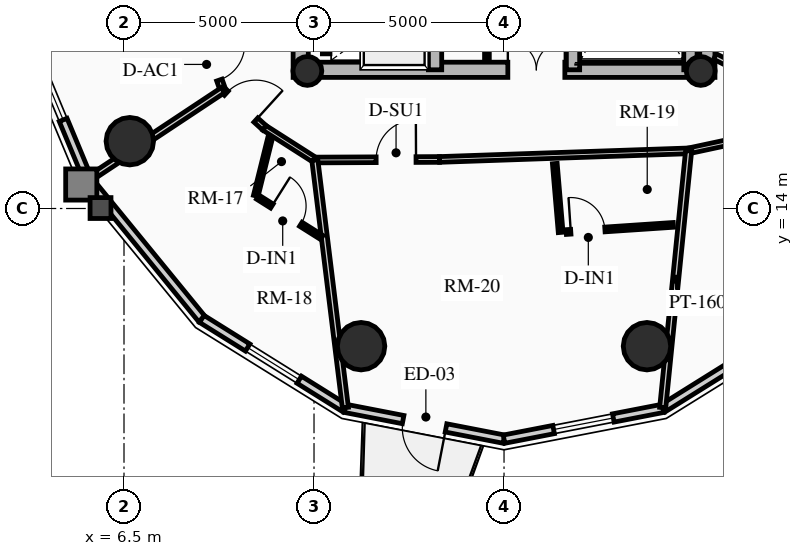
"""IFC4 building model, lengths in metres.
Left out: names, types, materials, properties, quantities, classifications, styles, units other than length and angle.
Written with IfcOpenShell. Run it as: python <this file> out.ifc"""

import sys

from ifc_helpers import new_model, si_unit, direction, frame, frame_2d, origin, origin_2d, place, context, subcontext, project, spatial, rectangle, circle, hollow_circle, extrude, source, transform, mapped, element, fill, save


model = new_model("IFC4")
c1 = context("Model", 3, precision=1e-05, world=origin(), true_north=direction((0.0, 1.0)))
c2 = subcontext(c1, "Body", "Model", "MODEL_VIEW")
j1 = project(units=[si_unit("LENGTHUNIT", "METRE"), si_unit("PLANEANGLEUNIT", "RADIAN")], contexts=[c1])
p1 = place(None, origin())
s1 = spatial("IfcSite", under=j1, at=p1, CompositionType="ELEMENT")
p2 = place(p1, origin())
s2 = spatial("IfcBuilding", under=s1, at=p2, CompositionType="ELEMENT")
p3 = place(p2, frame((0.0, 0.0, 177.79)))
s3 = spatial("IfcBuildingStorey", under=s2, at=p3, CompositionType="ELEMENT", Elevation=177.79)
for number, where, z_axis, x_axis in (
    (1, (11.15, 17.45, 0.0), (0.0, 0.0, 1.0), (0.0, 1.0, 0.0)),
    (2, (21.85, 17.45, 0.0), (0.0, 0.0, 1.0), (0.0, 1.0, 0.0)),
):
    element("IfcWall", number, at=place(p3, frame(where, z_axis=z_axis, x_axis=x_axis)), inside=s3, PredefinedType="SHEAR", context=c2, shape_type="SweptSolid", body=[
        extrude(rectangle(XDim=14.1, YDim=0.4, at=frame_2d((7.05, 0.0))), origin(), (0.0, 0.0, 1.0), 2.91),
    ])
p4 = place(p3, frame((11.15, 17.65, 0.0), z_axis=(0.0, 0.0, 1.0), x_axis=(1.0, 0.0, 0.0)))
e3 = element("IfcWall", 3, at=p4, inside=s3, PredefinedType="SHEAR", context=c2, shape_type="SweptSolid", body=[
    extrude(rectangle(XDim=10.7, YDim=0.4, at=frame_2d((5.35, 0.0))), origin(), (0.0, 0.0, 1.0), 2.91),
])
m1 = source(origin(), c2, "Body", "SweptSolid", [
    extrude(rectangle(XDim=1.5, YDim=2.02, at=frame_2d((0.75, 1.01))), frame((0.0, 0.21, 0.0), z_axis=(0.0, -1.0, 0.0), x_axis=(1.0, 0.0, 0.0)), (0.0, 0.0, 1.0), 0.42),
])
p5 = place(p4, frame((5.45, 0.0, 0.0)))
e4 = element("IfcOpeningElement", 4, at=p5, cuts=e3, PredefinedType="OPENING", context=c2, shape_type="MappedRepresentation", body=[
    mapped(m1, transform((0.0, 0.0, 0.0), x_axis=(1.0, 0.0, 0.0), y_axis=(0.0, 1.0, 0.0), z_axis=(0.0, 0.0, 1.0), scale=1.0)),
])
p6 = place(p3, frame((14.685, 17.65, 0.0), z_axis=(0.0, 0.0, 1.0), x_axis=(0.0, 1.0, 0.0)))
e5 = element("IfcWall", 5, at=p6, inside=s3, PredefinedType="SHEAR", context=c2, shape_type="SweptSolid", body=[
    extrude(rectangle(XDim=13.7, YDim=0.35, at=frame_2d((6.85, 0.0))), origin(), (0.0, 0.0, 1.0), 2.91),
])
m2 = source(origin(), c2, "Body", "SweptSolid", [
    extrude(rectangle(XDim=1.1, YDim=2.015, at=frame_2d((0.55, 1.007))), frame((0.0, 0.185, 0.0), z_axis=(0.0, -1.0, 0.0), x_axis=(1.0, 0.0, 0.0)), (0.0, 0.0, 1.0), 0.37),
])
p7 = place(p6, frame((4.85, 0.0, 0.0)))
e6 = element("IfcOpeningElement", 6, at=p7, cuts=e5, PredefinedType="OPENING", context=c2, shape_type="MappedRepresentation", body=[
    mapped(m2, transform((0.0, 0.0, 0.0), x_axis=(1.0, 0.0, 0.0), y_axis=(0.0, 1.0, 0.0), z_axis=(0.0, 0.0, 1.0), scale=1.0)),
])
p8 = place(p6, frame((0.625, 0.0, 0.0)))
e7 = element("IfcOpeningElement", 7, at=p8, cuts=e5, PredefinedType="OPENING", context=c2, shape_type="MappedRepresentation", body=[
    mapped(m2, transform((0.0, 0.0, 0.0), x_axis=(1.0, 0.0, 0.0), y_axis=(0.0, 1.0, 0.0), z_axis=(0.0, 0.0, 1.0), scale=1.0)),
])
p9 = place(p6, frame((2.625, 0.0, 0.0)))
e8 = element("IfcOpeningElement", 8, at=p9, cuts=e5, PredefinedType="OPENING", context=c2, shape_type="MappedRepresentation", body=[
    mapped(m2, transform((0.0, 0.0, 0.0), x_axis=(1.0, 0.0, 0.0), y_axis=(0.0, 1.0, 0.0), z_axis=(0.0, 0.0, 1.0), scale=1.0)),
])
m3 = source(origin(), c2, "Body", "SweptSolid", [
    extrude(rectangle(XDim=1.15, YDim=2.02, at=frame_2d((0.575, 1.01))), frame((0.0, 0.185, 0.0), z_axis=(0.0, -1.0, 0.0), x_axis=(1.0, 0.0, 0.0)), (0.0, 0.0, 1.0), 0.37),
])
p10 = place(p6, frame((7.27, 0.0, 0.0)))
e9 = element("IfcOpeningElement", 9, at=p10, cuts=e5, PredefinedType="OPENING", context=c2, shape_type="MappedRepresentation", body=[
    mapped(m3, transform((0.0, 0.0, 0.0), x_axis=(1.0, 0.0, 0.0), y_axis=(0.0, 1.0, 0.0), z_axis=(0.0, 0.0, 1.0), scale=1.0)),
])
p11 = place(p3, frame((18.315, 17.65, 0.0), z_axis=(0.0, 0.0, 1.0), x_axis=(0.0, 1.0, 0.0)))
e10 = element("IfcWall", 10, at=p11, inside=s3, PredefinedType="SHEAR", context=c2, shape_type="SweptSolid", body=[
    extrude(rectangle(XDim=9.6, YDim=0.35, at=frame_2d((4.8, 0.0))), origin(), (0.0, 0.0, 1.0), 2.91),
])
p12 = place(p11, frame((5.28, 0.0, 0.0)))
e11 = element("IfcOpeningElement", 11, at=p12, cuts=e10, PredefinedType="OPENING", context=c2, shape_type="MappedRepresentation", body=[
    mapped(m3, transform((0.0, 0.0, 0.0), x_axis=(1.0, 0.0, 0.0), y_axis=(0.0, 1.0, 0.0), z_axis=(0.0, 0.0, 1.0), scale=1.0)),
])
p13 = place(p3, frame((21.405, 17.65, 0.0), z_axis=(0.0, 0.0, 1.0), x_axis=(0.0, 1.0, 0.0)))
e12 = element("IfcWall", 12, at=p13, inside=s3, PredefinedType="SHEAR", context=c2, shape_type="SweptSolid", body=[
    extrude(rectangle(XDim=6.695, YDim=0.35, at=frame_2d((3.348, 0.0))), origin(), (0.0, 0.0, 1.0), 2.91),
])
for number, where, z_axis, x_axis in (
    (13, (11.325, 17.62, 0.0), (0.0, 0.0, 1.0), (1.0, 0.0, 0.0)),
    (14, (21.675, 17.62, 0.0), (0.0, 0.0, 1.0), (1.0, 0.0, 0.0)),
):
    element("IfcColumn", number, at=place(p3, frame(where, z_axis=z_axis, x_axis=x_axis)), inside=s3, PredefinedType="COLUMN", context=c2, shape_type="SweptSolid", body=[
        extrude(hollow_circle(Radius=0.38, WallThickness=0.032, at=origin_2d()), origin(), (0.0, 0.0, 1.0), 2.91),
    ])
for number, where, z_axis, x_axis in (
    (15, (6.653, 15.771, 0.0), (0.0, 0.0, 1.0), (1.0, 0.0, 0.0)),
    (16, (12.739, 10.377, 0.0), (0.0, 0.0, 1.0), (1.0, 0.0, 0.0)),
    (17, (20.261, 10.377, 0.0), (0.0, 0.0, 1.0), (1.0, 0.0, 0.0)),
):
    element("IfcColumn", number, at=place(p3, frame(where, z_axis=z_axis, x_axis=x_axis)), inside=s3, PredefinedType="USERDEFINED", context=c2, shape_type="SweptSolid", body=[
        extrude(circle(Radius=0.625, at=origin_2d()), origin(), (0.0, 0.0, 1.0), 2.91),
    ])
p14 = place(p3, frame((5.553, 14.76, 0.0), z_axis=(0.0, 0.0, 1.0), x_axis=(-0.384144094086, 0.923273152961, 0.0)))
e18 = element("IfcWall", 18, at=p14, inside=s3, PredefinedType="SOLIDWALL", context=c2, shape_type="SweptSolid", body=[
    extrude(rectangle(XDim=5.003, YDim=0.22, at=frame_2d((2.501, 0.0))), origin(), (0.0, 0.0, 1.0), 2.245),
])
m4 = source(origin(), c2, "Body", "SweptSolid", [
    extrude(rectangle(XDim=1.6, YDim=1.3, at=frame_2d((0.8, 0.65))), frame((0.0, 0.12, 0.0), z_axis=(0.0, -1.0, 0.0), x_axis=(1.0, 0.0, 0.0)), (0.0, 0.0, 1.0), 0.24),
])
p15 = place(p14, frame((1.702, 0.0, 0.65)))
e19 = element("IfcOpeningElement", 19, at=p15, cuts=e18, PredefinedType="OPENING", context=c2, shape_type="MappedRepresentation", body=[
    mapped(m4, transform((0.0, 0.0, 0.0), x_axis=(1.0, 0.0, 0.0), y_axis=(0.0, 1.0, 0.0), z_axis=(0.0, 0.0, 1.0), scale=1.0)),
])
p16 = place(p3, frame((8.547, 11.094, 0.0), z_axis=(0.0, 0.0, 1.0), x_axis=(-0.632470615287, 0.774584353572, 0.0)))
e20 = element("IfcWall", 20, at=p16, inside=s3, PredefinedType="SOLIDWALL", context=c2, shape_type="SweptSolid", body=[
    extrude(rectangle(XDim=4.733, YDim=0.22, at=frame_2d((2.366, 0.0))), origin(), (0.0, 0.0, 1.0), 2.245),
])
p17 = place(p3, frame((12.319, 8.741, 0.0), z_axis=(0.0, 0.0, 1.0), x_axis=(-0.848399108042, 0.529357113368, 0.0)))
e21 = element("IfcWall", 21, at=p17, inside=s3, PredefinedType="SOLIDWALL", context=c2, shape_type="SweptSolid", body=[
    extrude(rectangle(XDim=4.446, YDim=0.22, at=frame_2d((2.223, 0.0))), origin(), (0.0, 0.0, 1.0), 2.245),
])
p18 = place(p17, frame((1.423, 0.0, 0.65)))
e22 = element("IfcOpeningElement", 22, at=p18, cuts=e21, PredefinedType="OPENING", context=c2, shape_type="MappedRepresentation", body=[
    mapped(m4, transform((0.0, 0.0, 0.0), x_axis=(1.0, 0.0, 0.0), y_axis=(0.0, 1.0, 0.0), z_axis=(0.0, 0.0, 1.0), scale=1.0)),
])
p19 = place(p3, frame((16.5, 7.93, 0.0), z_axis=(0.0, 0.0, 1.0), x_axis=(-0.981703883443, 0.190413983815, 0.0)))
e23 = element("IfcWall", 23, at=p19, inside=s3, PredefinedType="SOLIDWALL", context=c2, shape_type="SweptSolid", body=[
    extrude(rectangle(XDim=4.259, YDim=0.22, at=frame_2d((2.13, 0.0))), origin(), (0.0, 0.0, 1.0), 2.245),
])
m5 = source(origin(), c2, "Body", "SweptSolid", [
    extrude(rectangle(XDim=1.15, YDim=2.005, at=frame_2d((0.575, 1.002))), frame((0.0, 0.12, 0.0), z_axis=(0.0, -1.0, 0.0), x_axis=(1.0, 0.0, 0.0)), (0.0, 0.0, 1.0), 0.24),
])
p20 = place(p19, frame((1.555, 0.0, 0.0)))
e24 = element("IfcOpeningElement", 24, at=p20, cuts=e23, PredefinedType="OPENING", context=c2, shape_type="MappedRepresentation", body=[
    mapped(m5, transform((0.0, 0.0, 0.0), x_axis=(1.0, 0.0, 0.0), y_axis=(0.0, 1.0, 0.0), z_axis=(0.0, 0.0, 1.0), scale=1.0)),
])
p21 = place(p3, frame((20.681, 8.741, 0.0), z_axis=(0.0, 0.0, 1.0), x_axis=(-0.981703883443, -0.190413983815, 0.0)))
e25 = element("IfcWall", 25, at=p21, inside=s3, PredefinedType="SOLIDWALL", context=c2, shape_type="SweptSolid", body=[
    extrude(rectangle(XDim=4.259, YDim=0.22, at=frame_2d((2.13, 0.0))), origin(), (0.0, 0.0, 1.0), 2.245),
])
p22 = place(p21, frame((1.33, 0.0, 0.65)))
e26 = element("IfcOpeningElement", 26, at=p22, cuts=e25, PredefinedType="OPENING", context=c2, shape_type="MappedRepresentation", body=[
    mapped(m4, transform((0.0, 0.0, 0.0), x_axis=(1.0, 0.0, 0.0), y_axis=(0.0, 1.0, 0.0), z_axis=(0.0, 0.0, 1.0), scale=1.0)),
])
p23 = place(p3, frame((24.453, 11.094, 0.0), z_axis=(0.0, 0.0, 1.0), x_axis=(-0.848399108042, -0.529357113368, 0.0)))
e27 = element("IfcWall", 27, at=p23, inside=s3, PredefinedType="SOLIDWALL", context=c2, shape_type="SweptSolid", body=[
    extrude(rectangle(XDim=4.446, YDim=0.22, at=frame_2d((2.223, 0.0))), origin(), (0.0, 0.0, 1.0), 2.245),
])
p24 = place(p3, frame((11.82, 18.07, 0.0), z_axis=(0.0, 0.0, 1.0), x_axis=(0.0, 1.0, 0.0)))
e28 = element("IfcWall", 28, at=p24, inside=s3, PredefinedType="SHEAR", context=c2, shape_type="SweptSolid", body=[
    extrude(rectangle(XDim=1.635, YDim=0.2, at=frame_2d((0.817, 0.0))), origin(), (0.0, 0.0, 1.0), 2.91),
])
p25 = place(p3, frame((16.05, 17.92, 0.0), z_axis=(0.0, 0.0, 1.0), x_axis=(0.0, 1.0, 0.0)))
e29 = element("IfcWall", 29, at=p25, inside=s3, PredefinedType="PARTITIONING", context=c2, shape_type="SweptSolid", body=[
    extrude(rectangle(XDim=1.8, YDim=0.125, at=frame_2d((0.9, 0.0))), origin(), (0.0, 0.0, 1.0), 2.675),
])
m6 = source(origin(), c2, "Body", "SweptSolid", [
    extrude(rectangle(XDim=0.9, YDim=2.005, at=frame_2d((0.45, 1.002))), frame((0.0, 0.073, 0.0), z_axis=(0.0, -1.0, 0.0), x_axis=(1.0, 0.0, 0.0)), (0.0, 0.0, 1.0), 0.145),
])
p26 = place(p25, frame((0.42, 0.0, 0.0)))
e30 = element("IfcOpeningElement", 30, at=p26, cuts=e29, PredefinedType="OPENING", context=c2, shape_type="MappedRepresentation", body=[
    mapped(m6, transform((0.0, 0.0, 0.0), x_axis=(1.0, 0.0, 0.0), y_axis=(0.0, 1.0, 0.0), z_axis=(0.0, 0.0, 1.0), scale=1.0)),
])
p27 = place(p3, frame((8.636, 18.436, 0.0), z_axis=(0.0, 0.0, 1.0), x_axis=(0.333211866524, -0.942851977782, 0.0)))
e31 = element("IfcWall", 31, at=p27, inside=s3, PredefinedType="PARTITIONING", context=c2, shape_type="SweptSolid", body=[
    extrude(rectangle(XDim=1.402, YDim=0.15, at=frame_2d((0.701, 0.0))), origin(), (0.0, 0.0, 1.0), 2.245),
])
m7 = source(origin(), c2, "Body", "SweptSolid", [
    extrude(rectangle(XDim=1.0, YDim=2.015, at=frame_2d((0.5, 1.007))), frame((0.0, 0.085, 0.0), z_axis=(0.0, -1.0, 0.0), x_axis=(1.0, 0.0, 0.0)), (0.0, 0.0, 1.0), 0.17),
])
p28 = place(p27, frame((0.12, 0.0, 0.0)))
e32 = element("IfcOpeningElement", 32, at=p28, cuts=e31, PredefinedType="OPENING", context=c2, shape_type="MappedRepresentation", body=[
    mapped(m7, transform((0.0, 0.0, 0.0), x_axis=(1.0, 0.0, 0.0), y_axis=(0.0, 1.0, 0.0), z_axis=(0.0, 0.0, 1.0), scale=1.0)),
])
p29 = place(p3, frame((9.103, 17.115, 0.0), z_axis=(0.0, 0.0, 1.0), x_axis=(0.740186897911, -0.672401186912, 0.0)))
e33 = element("IfcWall", 33, at=p29, inside=s3, PredefinedType="PARTITIONING", context=c2, shape_type="SweptSolid", body=[
    extrude(rectangle(XDim=1.477, YDim=0.15, at=frame_2d((0.738, 0.0))), origin(), (0.0, 0.0, 1.0), 2.245),
])
m8 = source(origin(), c2, "Body", "SweptSolid", [
    extrude(rectangle(XDim=1.05, YDim=2.015, at=frame_2d((0.525, 1.007))), frame((0.0, 0.085, 0.0), z_axis=(0.0, -1.0, 0.0), x_axis=(1.0, 0.0, 0.0)), (0.0, 0.0, 1.0), 0.17),
])
p30 = place(p29, frame((0.12, 0.0, 0.0)))
e34 = element("IfcOpeningElement", 34, at=p30, cuts=e33, PredefinedType="OPENING", context=c2, shape_type="MappedRepresentation", body=[
    mapped(m8, transform((0.0, 0.0, 0.0), x_axis=(1.0, 0.0, 0.0), y_axis=(0.0, 1.0, 0.0), z_axis=(0.0, 0.0, 1.0), scale=1.0)),
])
p31 = place(p3, frame((10.196, 16.122, 0.0), z_axis=(0.0, 0.0, 1.0), x_axis=(0.843021142441, -0.537880426673, 0.0)))
e35 = element("IfcWall", 35, at=p31, inside=s3, PredefinedType="PARTITIONING", context=c2, shape_type="SweptSolid", body=[
    extrude(rectangle(XDim=1.571, YDim=0.15, at=frame_2d((0.786, 0.0))), origin(), (0.0, 0.0, 1.0), 2.245),
])
p32 = place(p3, frame((11.521, 15.276, 0.0), z_axis=(0.0, 0.0, 1.0), x_axis=(0.999990688463, 0.004315436007, 0.0)))
e36 = element("IfcWall", 36, at=p32, inside=s3, PredefinedType="PARTITIONING", context=c2, shape_type="SweptSolid", body=[
    extrude(rectangle(XDim=3.281, YDim=0.15, at=frame_2d((1.641, 0.0))), origin(), (0.0, 0.0, 1.0), 2.245),
])
p33 = place(p32, frame((1.613, 0.0, 0.0)))
e37 = element("IfcOpeningElement", 37, at=p33, cuts=e36, PredefinedType="OPENING", context=c2, shape_type="MappedRepresentation", body=[
    mapped(m8, transform((0.0, 0.0, 0.0), x_axis=(1.0, 0.0, 0.0), y_axis=(0.0, 1.0, 0.0), z_axis=(0.0, 0.0, 1.0), scale=1.0)),
])
p34 = place(p3, frame((14.802, 15.291, 0.0), z_axis=(0.0, 0.0, 1.0), x_axis=(0.999405778293, 0.034468686011, 0.0)))
e38 = element("IfcWall", 38, at=p34, inside=s3, PredefinedType="PARTITIONING", context=c2, shape_type="SweptSolid", body=[
    extrude(rectangle(XDim=6.559, YDim=0.15, at=frame_2d((3.279, 0.0))), origin(), (0.0, 0.0, 1.0), 2.245),
])
p35 = place(p3, frame((21.357, 15.517, 0.0), z_axis=(0.0, 0.0, 1.0), x_axis=(0.977773676035, 0.209663154733, 0.0)))
e39 = element("IfcWall", 39, at=p35, inside=s3, PredefinedType="PARTITIONING", context=c2, shape_type="SweptSolid", body=[
    extrude(rectangle(XDim=1.865, YDim=0.15, at=frame_2d((0.933, 0.0))), origin(), (0.0, 0.0, 1.0), 2.245),
])
p36 = place(p3, frame((9.103, 17.115, 0.0), z_axis=(0.0, 0.0, 1.0), x_axis=(-0.833535637115, -0.552465692745, 0.0)))
e40 = element("IfcWall", 40, at=p36, inside=s3, PredefinedType="PARTITIONING", context=c2, shape_type="SweptSolid", body=[
    extrude(rectangle(XDim=4.24, YDim=0.16, at=frame_2d((2.12, 0.0))), origin(), (0.0, 0.0, 1.0), 2.245),
])
p37 = place(p3, frame((11.521, 15.276, 0.0), z_axis=(0.0, 0.0, 1.0), x_axis=(0.122446537769, -0.992475110715, 0.0)))
e41 = element("IfcWall", 41, at=p37, inside=s3, PredefinedType="PARTITIONING", context=c2, shape_type="SweptSolid", body=[
    extrude(rectangle(XDim=6.566, YDim=0.16, at=frame_2d((3.283, 0.0))), origin(), (0.0, 0.0, 1.0), 2.245),
])
p38 = place(p3, frame((21.357, 15.517, 0.0), z_axis=(0.0, 0.0, 1.0), x_axis=(-0.100446941693, -0.994942416376, 0.0)))
e42 = element("IfcWall", 42, at=p38, inside=s3, PredefinedType="PARTITIONING", context=c2, shape_type="SweptSolid", body=[
    extrude(rectangle(XDim=6.791, YDim=0.16, at=frame_2d((3.396, 0.0))), origin(), (0.0, 0.0, 1.0), 2.245),
])
p39 = place(p3, frame((22.05, 18.0, 0.0), z_axis=(0.0, 0.0, 1.0), x_axis=(0.890660222535, -0.454669515136, 0.0)))
e43 = element("IfcWall", 43, at=p39, inside=s3, PredefinedType="PARTITIONING", context=c2, shape_type="SweptSolid", body=[
    extrude(rectangle(XDim=2.144, YDim=0.16, at=frame_2d((1.072, 0.0))), origin(), (0.0, 0.0, 1.0), 2.245),
])
m9 = source(origin(), c2, "Body", "SweptSolid", [
    extrude(rectangle(XDim=1.05, YDim=2.015, at=frame_2d((0.525, 1.007))), frame((0.0, 0.09, 0.0), z_axis=(0.0, -1.0, 0.0), x_axis=(1.0, 0.0, 0.0)), (0.0, 0.0, 1.0), 0.18),
])
p40 = place(p39, frame((0.894, 0.0, 0.0)))
e44 = element("IfcOpeningElement", 44, at=p40, cuts=e43, PredefinedType="OPENING", context=c2, shape_type="MappedRepresentation", body=[
    mapped(m9, transform((0.0, 0.0, 0.0), x_axis=(1.0, 0.0, 0.0), y_axis=(0.0, 1.0, 0.0), z_axis=(0.0, 0.0, 1.0), scale=1.0)),
])
p41 = place(p3, frame((10.343, 15.847, 0.0), z_axis=(0.0, 0.0, 1.0), x_axis=(-0.240988864291, -0.970527880737, 0.0)))
e45 = element("IfcWall", 45, at=p41, inside=s3, PredefinedType="PARTITIONING", context=c2, shape_type="SweptSolid", body=[
    extrude(rectangle(XDim=1.56, YDim=0.125, at=frame_2d((0.78, 0.0))), origin(), (0.0, 0.0, 1.0), 2.245),
])
p42 = place(p3, frame((10.02, 14.299, 0.0), z_axis=(0.0, 0.0, 1.0), x_axis=(0.846015763056, -0.533157883427, 0.0)))
e46 = element("IfcWall", 46, at=p42, inside=s3, PredefinedType="PARTITIONING", context=c2, shape_type="SweptSolid", body=[
    extrude(rectangle(XDim=1.991, YDim=0.125, at=frame_2d((0.996, 0.0))), origin(), (0.0, 0.0, 1.0), 2.675),
])
p43 = place(p42, frame((0.439, 0.0, 0.0)))
e47 = element("IfcOpeningElement", 47, at=p43, cuts=e46, PredefinedType="OPENING", context=c2, shape_type="MappedRepresentation", body=[
    mapped(m6, transform((0.0, 0.0, 0.0), x_axis=(1.0, 0.0, 0.0), y_axis=(0.0, 1.0, 0.0), z_axis=(0.0, 0.0, 1.0), scale=1.0)),
])
p44 = place(p3, frame((17.836, 15.182, 0.0), z_axis=(0.0, 0.0, 1.0), x_axis=(0.084856554172, -0.996393178025, 0.0)))
e48 = element("IfcWall", 48, at=p44, inside=s3, PredefinedType="PARTITIONING", context=c2, shape_type="SweptSolid", body=[
    extrude(rectangle(XDim=1.818, YDim=0.125, at=frame_2d((0.909, 0.0))), origin(), (0.0, 0.0, 1.0), 2.675),
])
p45 = place(p3, frame((18.137, 13.38, 0.0), z_axis=(0.0, 0.0, 1.0), x_axis=(0.997767152953, 0.066788535611, 0.0)))
e49 = element("IfcWall", 49, at=p45, inside=s3, PredefinedType="PARTITIONING", context=c2, shape_type="SweptSolid", body=[
    extrude(rectangle(XDim=2.826, YDim=0.125, at=frame_2d((1.413, 0.0))), origin(), (0.0, 0.0, 1.0), 2.245),
])
p46 = place(p45, frame((0.12, 0.0, 0.0)))
e50 = element("IfcOpeningElement", 50, at=p46, cuts=e49, PredefinedType="OPENING", context=c2, shape_type="MappedRepresentation", body=[
    mapped(m6, transform((0.0, 0.0, 0.0), x_axis=(1.0, 0.0, 0.0), y_axis=(0.0, 1.0, 0.0), z_axis=(0.0, 0.0, 1.0), scale=1.0)),
])
m10 = source(origin(), c2, "Body", "SweptSolid", [
    extrude(rectangle(XDim=1.6, YDim=1.3, at=frame_2d((0.8, 0.65))), frame((0.0, 0.03, 0.0), z_axis=(0.0, -1.0, 0.0), x_axis=(1.0, 0.0, 0.0)), (0.0, 0.0, 1.0), 0.06),
])
p47 = place(p15, origin())
e51 = element("IfcWindow", 51, at=p47, inside=s3, PartitioningType="SINGLE_PANEL", PredefinedType="WINDOW", context=c2, shape_type="MappedRepresentation", body=[
    mapped(m10, transform((0.0, 0.0, 0.0), x_axis=(1.0, 0.0, 0.0), y_axis=(0.0, 1.0, 0.0), z_axis=(0.0, 0.0, 1.0), scale=1.0)),
])
fill(e19, e51)
p48 = place(p18, origin())
e52 = element("IfcWindow", 52, at=p48, inside=s3, PartitioningType="SINGLE_PANEL", PredefinedType="WINDOW", context=c2, shape_type="MappedRepresentation", body=[
    mapped(m10, transform((0.0, 0.0, 0.0), x_axis=(1.0, 0.0, 0.0), y_axis=(0.0, 1.0, 0.0), z_axis=(0.0, 0.0, 1.0), scale=1.0)),
])
fill(e22, e52)
m11 = source(origin(), c2, "Body", "SweptSolid", [
    extrude(rectangle(XDim=1.15, YDim=2.005, at=frame_2d((0.575, 1.002))), frame((0.0, 0.025, 0.0), z_axis=(0.0, -1.0, 0.0), x_axis=(1.0, 0.0, 0.0)), (0.0, 0.0, 1.0), 0.05),
])
p49 = place(p20, origin())
e53 = element("IfcDoor", 53, at=p49, inside=s3, OperationType="SINGLE_SWING_LEFT", PredefinedType="DOOR", context=c2, shape_type="MappedRepresentation", body=[
    mapped(m11, transform((0.0, 0.0, 0.0), x_axis=(1.0, 0.0, 0.0), y_axis=(0.0, 1.0, 0.0), z_axis=(0.0, 0.0, 1.0), scale=1.0)),
])
fill(e24, e53)
p50 = place(p22, origin())
e54 = element("IfcWindow", 54, at=p50, inside=s3, PartitioningType="SINGLE_PANEL", PredefinedType="WINDOW", context=c2, shape_type="MappedRepresentation", body=[
    mapped(m10, transform((0.0, 0.0, 0.0), x_axis=(1.0, 0.0, 0.0), y_axis=(0.0, 1.0, 0.0), z_axis=(0.0, 0.0, 1.0), scale=1.0)),
])
fill(e26, e54)
m12 = source(origin(), c2, "Body", "SweptSolid", [
    extrude(rectangle(XDim=1.5, YDim=2.02, at=frame_2d((0.75, 1.01))), frame((0.0, 0.025, 0.0), z_axis=(0.0, -1.0, 0.0), x_axis=(1.0, 0.0, 0.0)), (0.0, 0.0, 1.0), 0.05),
])
p51 = place(p5, origin())
e55 = element("IfcDoor", 55, at=p51, inside=s3, OperationType="DOUBLE_DOOR_SINGLE_SWING", PredefinedType="DOOR", context=c2, shape_type="MappedRepresentation", body=[
    mapped(m12, transform((0.0, 0.0, 0.0), x_axis=(1.0, 0.0, 0.0), y_axis=(0.0, 1.0, 0.0), z_axis=(0.0, 0.0, 1.0), scale=1.0)),
])
fill(e4, e55)
m13 = source(origin(), c2, "Body", "SweptSolid", [
    extrude(rectangle(XDim=1.0, YDim=2.015, at=frame_2d((0.5, 1.007))), frame((0.0, 0.025, 0.0), z_axis=(0.0, -1.0, 0.0), x_axis=(1.0, 0.0, 0.0)), (0.0, 0.0, 1.0), 0.05),
])
p52 = place(p28, origin())
e56 = element("IfcDoor", 56, at=p52, inside=s3, OperationType="SINGLE_SWING_LEFT", PredefinedType="DOOR", context=c2, shape_type="MappedRepresentation", body=[
    mapped(m13, transform((0.0, 0.0, 0.0), x_axis=(1.0, 0.0, 0.0), y_axis=(0.0, 1.0, 0.0), z_axis=(0.0, 0.0, 1.0), scale=1.0)),
])
fill(e32, e56)
m14 = source(origin(), c2, "Body", "SweptSolid", [
    extrude(rectangle(XDim=1.05, YDim=2.015, at=frame_2d((0.525, 1.007))), frame((0.0, 0.025, 0.0), z_axis=(0.0, -1.0, 0.0), x_axis=(1.0, 0.0, 0.0)), (0.0, 0.0, 1.0), 0.05),
])
p53 = place(p30, origin())
e57 = element("IfcDoor", 57, at=p53, inside=s3, OperationType="SINGLE_SWING_RIGHT", PredefinedType="DOOR", context=c2, shape_type="MappedRepresentation", body=[
    mapped(m14, transform((0.0, 0.0, 0.0), x_axis=(1.0, 0.0, 0.0), y_axis=(0.0, 1.0, 0.0), z_axis=(0.0, 0.0, 1.0), scale=1.0)),
])
fill(e34, e57)
m15 = source(origin(), c2, "Body", "SweptSolid", [
    extrude(rectangle(XDim=0.9, YDim=2.005, at=frame_2d((0.45, 1.002))), frame((0.0, 0.025, 0.0), z_axis=(0.0, -1.0, 0.0), x_axis=(1.0, 0.0, 0.0)), (0.0, 0.0, 1.0), 0.05),
])
p54 = place(p43, origin())
e58 = element("IfcDoor", 58, at=p54, inside=s3, OperationType="SINGLE_SWING_LEFT", PredefinedType="DOOR", context=c2, shape_type="MappedRepresentation", body=[
    mapped(m15, transform((0.0, 0.0, 0.0), x_axis=(1.0, 0.0, 0.0), y_axis=(0.0, 1.0, 0.0), z_axis=(0.0, 0.0, 1.0), scale=1.0)),
])
fill(e47, e58)
p55 = place(p33, origin())
e59 = element("IfcDoor", 59, at=p55, inside=s3, OperationType="SINGLE_SWING_RIGHT", PredefinedType="DOOR", context=c2, shape_type="MappedRepresentation", body=[
    mapped(m14, transform((0.0, 0.0, 0.0), x_axis=(1.0, 0.0, 0.0), y_axis=(0.0, 1.0, 0.0), z_axis=(0.0, 0.0, 1.0), scale=1.0)),
])
fill(e37, e59)
p56 = place(p46, origin())
e60 = element("IfcDoor", 60, at=p56, inside=s3, OperationType="SINGLE_SWING_LEFT", PredefinedType="DOOR", context=c2, shape_type="MappedRepresentation", body=[
    mapped(m15, transform((0.0, 0.0, 0.0), x_axis=(1.0, 0.0, 0.0), y_axis=(0.0, 1.0, 0.0), z_axis=(0.0, 0.0, 1.0), scale=1.0)),
])
fill(e50, e60)
save(model, sys.argv[1])
